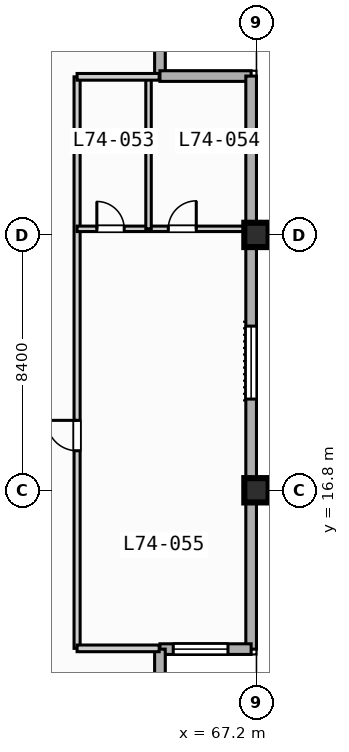
"""IFC4 building model, lengths in metres.
Left out: names, types, materials, properties, quantities, classifications, styles, units other than length and angle.
Written with IfcOpenShell. Run it as: python <this file> out.ifc"""

import sys

from ifc_helpers import new_model, si_unit, direction, frame, frame_2d, origin, origin_2d, place, context, subcontext, project, spatial, rectangle, extrude, element, fill, save


model = new_model("IFC4")
c1 = context("Model", 3, precision=1e-05, world=origin(), true_north=direction((0.0, 1.0)))
c2 = subcontext(c1, "Body", "Model", "MODEL_VIEW")
j1 = project(units=[si_unit("LENGTHUNIT", "METRE"), si_unit("PLANEANGLEUNIT", "RADIAN")], contexts=[c1])
p1 = place(None, origin())
s1 = spatial("IfcSite", under=j1, at=p1, CompositionType="ELEMENT")
p2 = place(p1, origin())
s2 = spatial("IfcBuilding", under=s1, at=p2, CompositionType="ELEMENT")
p3 = place(p2, frame((0.0, 0.0, 300.8)))
s3 = spatial("IfcBuildingStorey", under=s2, at=p3, CompositionType="ELEMENT", Elevation=300.8)
for number, where, z_axis, x_axis in (
    (1, (67.2, 16.8, 0.0), (0.0, 0.0, 1.0), (1.0, 0.0, 0.0)),
    (2, (67.2, 25.2, 0.0), (0.0, 0.0, 1.0), (1.0, 0.0, 0.0)),
):
    element("IfcColumn", number, at=place(p3, frame(where, z_axis=z_axis, x_axis=x_axis)), inside=s3, PredefinedType="COLUMN", context=c2, shape_type="SweptSolid", body=[
        extrude(rectangle(XDim=0.8, YDim=0.8, at=origin_2d()), origin(), (0.0, 0.0, 1.0), 3.9),
    ])
for number, where, z_axis, x_axis in (
    (3, (64.025, 33.425, 0.0), (0.0, 0.0, 1.0), (0.0, -1.0, 0.0)),
    (4, (64.025, 30.425, 0.0), (0.0, 0.0, 1.0), (1.0, 0.0, 0.0)),
):
    element("IfcWall", number, at=place(p3, frame(where, z_axis=z_axis, x_axis=x_axis)), inside=s3, PredefinedType="STANDARD", context=c2, shape_type="SweptSolid", body=[
        extrude(rectangle(XDim=3.0, YDim=0.35, at=frame_2d((1.5, 0.0))), origin(), (0.0, 0.0, 1.0), 3.67),
    ])
p4 = place(p3, frame((67.025, 30.425, 0.0), z_axis=(0.0, 0.0, 1.0), x_axis=(0.0, -1.0, 0.0)))
e5 = element("IfcWall", 5, at=p4, inside=s3, PredefinedType="STANDARD", context=c2, shape_type="SweptSolid", body=[
    extrude(rectangle(XDim=18.85, YDim=0.35, at=frame_2d((9.425, 0.0))), origin(), (0.0, 0.0, 1.0), 3.67),
])
p5 = place(p4, frame((8.225, 0.0, 0.85)))
e6 = element("IfcOpeningElement", 6, at=p5, cuts=e5, PredefinedType="OPENING", context=c2, shape_type="SweptSolid", body=[
    extrude(rectangle(XDim=2.4, YDim=1.95, at=frame_2d((1.2, 0.975))), frame((0.0, 0.185, 0.0), z_axis=(0.0, -1.0, 0.0), x_axis=(1.0, 0.0, 0.0)), (0.0, 0.0, 1.0), 0.37),
])
p6 = place(p3, frame((67.025, 11.575, 0.0), z_axis=(0.0, 0.0, 1.0), x_axis=(-1.0, 0.0, 0.0)))
e7 = element("IfcWall", 7, at=p6, inside=s3, PredefinedType="STANDARD", context=c2, shape_type="SweptSolid", body=[
    extrude(rectangle(XDim=3.0, YDim=0.35, at=frame_2d((1.5, 0.0))), origin(), (0.0, 0.0, 1.0), 3.67),
])
p7 = place(p6, frame((0.762, 0.0, 0.85)))
e8 = element("IfcOpeningElement", 8, at=p7, cuts=e7, PredefinedType="OPENING", context=c2, shape_type="SweptSolid", body=[
    extrude(rectangle(XDim=1.8, YDim=1.8, at=frame_2d((0.9, 0.9))), frame((0.0, 0.185, 0.0), z_axis=(0.0, -1.0, 0.0), x_axis=(1.0, 0.0, 0.0)), (0.0, 0.0, 1.0), 0.37),
])
p8 = place(p3, frame((64.025, 11.575, 0.0), z_axis=(0.0, 0.0, 1.0), x_axis=(0.0, -1.0, 0.0)))
e9 = element("IfcWall", 9, at=p8, inside=s3, PredefinedType="STANDARD", context=c2, shape_type="SweptSolid", body=[
    extrude(rectangle(XDim=3.0, YDim=0.35, at=frame_2d((1.5, 0.0))), origin(), (0.0, 0.0, 1.0), 3.67),
])
p9 = place(p3, frame((61.3, 11.6, 0.0), z_axis=(0.0, 0.0, 1.0), x_axis=(0.0, 1.0, 0.0)))
e10 = element("IfcWall", 10, at=p9, inside=s3, PredefinedType="PARTITIONING", context=c2, shape_type="SweptSolid", body=[
    extrude(rectangle(XDim=18.8, YDim=0.2, at=frame_2d((9.4, 0.0))), origin(), (0.0, 0.0, 1.0), 3.67),
])
p10 = place(p9, frame((6.5, 0.0, 0.0)))
e11 = element("IfcOpeningElement", 11, at=p10, cuts=e10, PredefinedType="OPENING", context=c2, shape_type="SweptSolid", body=[
    extrude(rectangle(XDim=1.0, YDim=2.15, at=frame_2d((0.5, 1.075))), frame((0.0, 0.11, 0.0), z_axis=(0.0, -1.0, 0.0), x_axis=(1.0, 0.0, 0.0)), (0.0, 0.0, 1.0), 0.22),
])
p11 = place(p3, frame((61.3, 25.4, 0.0), z_axis=(0.0, 0.0, 1.0), x_axis=(1.0, 0.0, 0.0)))
e12 = element("IfcWall", 12, at=p11, inside=s3, PredefinedType="PLUMBINGWALL", context=c2, shape_type="SweptSolid", body=[
    extrude(rectangle(XDim=5.5, YDim=0.18, at=frame_2d((2.75, 0.0))), origin(), (0.0, 0.0, 1.0), 3.07),
])
p12 = place(p11, frame((0.65, 0.0, 0.0)))
e13 = element("IfcOpeningElement", 13, at=p12, cuts=e12, PredefinedType="OPENING", context=c2, shape_type="SweptSolid", body=[
    extrude(rectangle(XDim=0.9, YDim=2.1, at=frame_2d((0.45, 1.05))), frame((0.0, 0.1, 0.0), z_axis=(0.0, -1.0, 0.0), x_axis=(1.0, 0.0, 0.0)), (0.0, 0.0, 1.0), 0.2),
])
p13 = place(p11, frame((3.0, 0.0, 0.0)))
e14 = element("IfcOpeningElement", 14, at=p13, cuts=e12, PredefinedType="OPENING", context=c2, shape_type="SweptSolid", body=[
    extrude(rectangle(XDim=0.92, YDim=2.1, at=frame_2d((0.46, 1.05))), frame((0.0, 0.1, 0.0), z_axis=(0.0, -1.0, 0.0), x_axis=(1.0, 0.0, 0.0)), (0.0, 0.0, 1.0), 0.2),
])
p14 = place(p3, frame((63.65, 25.4, 0.0), z_axis=(0.0, 0.0, 1.0), x_axis=(0.0, 1.0, 0.0)))
e15 = element("IfcWall", 15, at=p14, inside=s3, PredefinedType="PLUMBINGWALL", context=c2, shape_type="SweptSolid", body=[
    extrude(rectangle(XDim=5.0, YDim=0.18, at=frame_2d((2.5, 0.0))), origin(), (0.0, 0.0, 1.0), 3.67),
])
for number, where, z_axis, x_axis in (
    (16, (61.3, 11.6, 0.0), (0.0, 0.0, 1.0), (1.0, 0.0, 0.0)),
    (17, (61.3, 30.4, 0.0), (0.0, 0.0, 1.0), (1.0, 0.0, 0.0)),
):
    element("IfcWall", number, at=place(p3, frame(where, z_axis=z_axis, x_axis=x_axis)), inside=s3, PredefinedType="PARTITIONING", context=c2, shape_type="SweptSolid", body=[
        extrude(rectangle(XDim=2.7, YDim=0.22, at=frame_2d((1.35, 0.0))), origin(), (0.0, 0.0, 1.0), 3.67),
    ])
p15 = place(p5, origin())
e18 = element("IfcWindow", 18, at=p15, inside=s3, PartitioningType="SINGLE_PANEL", PredefinedType="WINDOW", context=c2, shape_type="SweptSolid", body=[
    extrude(rectangle(XDim=2.4, YDim=1.95, at=frame_2d((1.2, 0.975))), frame((0.0, 0.03, 0.0), z_axis=(0.0, -1.0, 0.0), x_axis=(1.0, 0.0, 0.0)), (0.0, 0.0, 1.0), 0.06),
])
fill(e6, e18)
p16 = place(p7, origin())
e19 = element("IfcWindow", 19, at=p16, inside=s3, PartitioningType="SINGLE_PANEL", PredefinedType="WINDOW", context=c2, shape_type="SweptSolid", body=[
    extrude(rectangle(XDim=1.8, YDim=1.8, at=frame_2d((0.9, 0.9))), frame((0.0, 0.03, 0.0), z_axis=(0.0, -1.0, 0.0), x_axis=(1.0, 0.0, 0.0)), (0.0, 0.0, 1.0), 0.06),
])
fill(e8, e19)
p17 = place(p10, origin())
e20 = element("IfcDoor", 20, at=p17, inside=s3, OperationType="SINGLE_SWING_RIGHT", PredefinedType="DOOR", context=c2, shape_type="SweptSolid", body=[
    extrude(rectangle(XDim=1.0, YDim=2.15, at=frame_2d((0.5, 1.075))), frame((0.0, 0.025, 0.0), z_axis=(0.0, -1.0, 0.0), x_axis=(1.0, 0.0, 0.0)), (0.0, 0.0, 1.0), 0.05),
])
fill(e11, e20)
p18 = place(p12, origin())
e21 = element("IfcDoor", 21, at=p18, inside=s3, OperationType="SINGLE_SWING_LEFT", PredefinedType="DOOR", context=c2, shape_type="SweptSolid", body=[
    extrude(rectangle(XDim=0.9, YDim=2.1, at=frame_2d((0.45, 1.05))), frame((0.0, 0.025, 0.0), z_axis=(0.0, -1.0, 0.0), x_axis=(1.0, 0.0, 0.0)), (0.0, 0.0, 1.0), 0.05),
])
fill(e13, e21)
p19 = place(p13, origin())
e22 = element("IfcDoor", 22, at=p19, inside=s3, OperationType="SINGLE_SWING_RIGHT", PredefinedType="DOOR", context=c2, shape_type="SweptSolid", body=[
    extrude(rectangle(XDim=0.92, YDim=2.1, at=frame_2d((0.46, 1.05))), frame((0.0, 0.025, 0.0), z_axis=(0.0, -1.0, 0.0), x_axis=(1.0, 0.0, 0.0)), (0.0, 0.0, 1.0), 0.05),
])
fill(e14, e22)
save(model, sys.argv[1])
